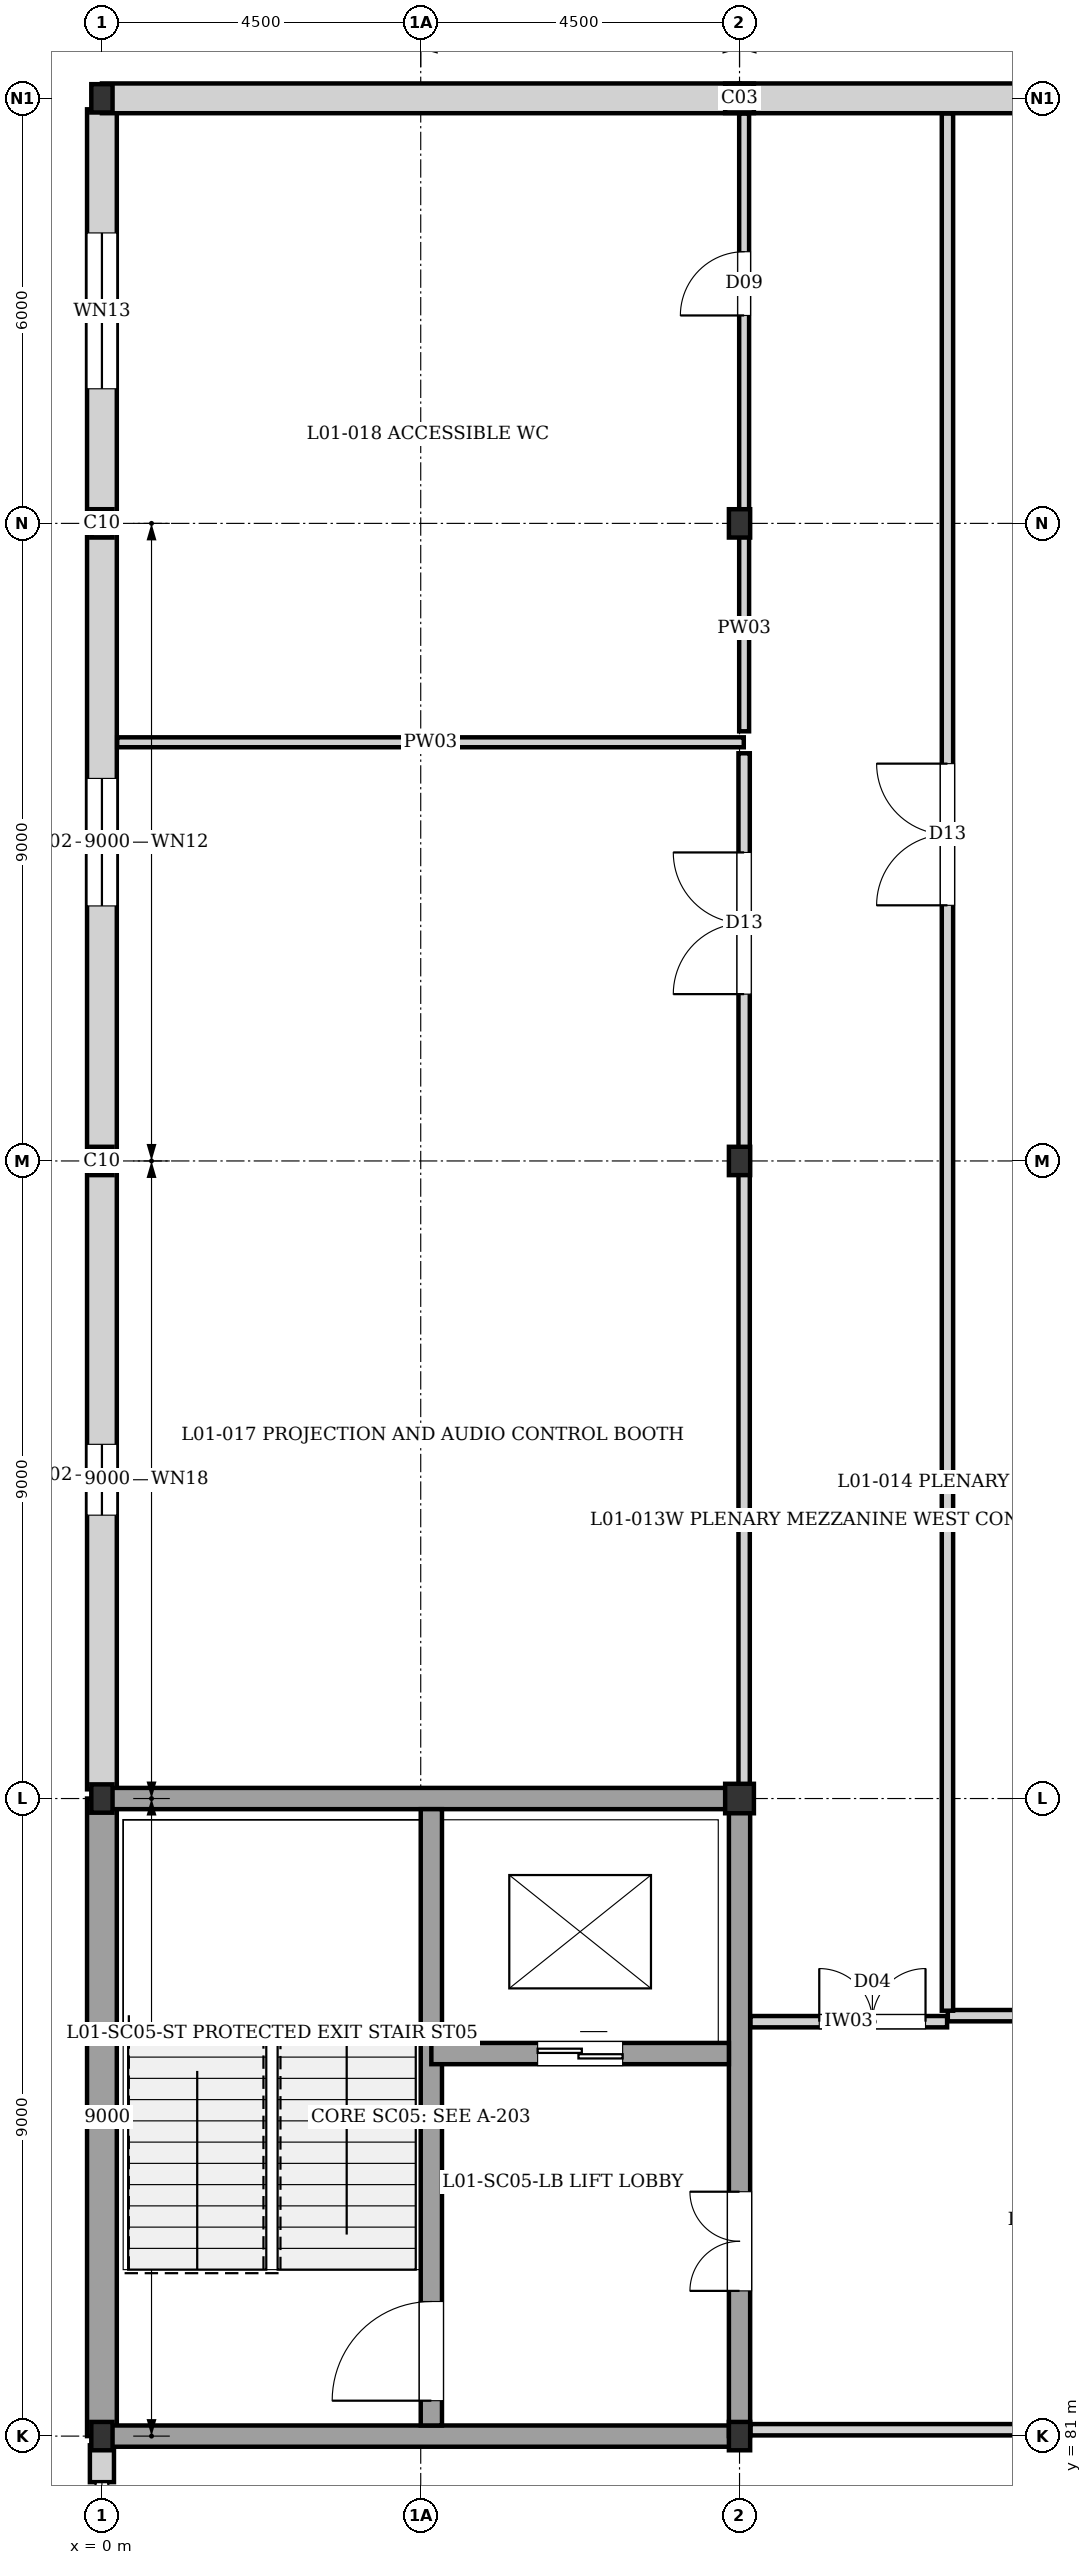
"""IFC4 building model, lengths in metres.
Left out: names, types, materials, properties, quantities, classifications, styles, units other than length and angle.
Written with IfcOpenShell. Run it as: python <this file> out.ifc"""

import sys

from ifc_helpers import new_model, si_unit, direction, frame, frame_2d, origin, origin_2d, place, context, subcontext, project, spatial, rectangle, i_section, extrude, element, fill, save


model = new_model("IFC4")
c1 = context("Model", 3, precision=1e-05, world=origin(), true_north=direction((0.0, 1.0)))
c2 = subcontext(c1, "Body", "Model", "MODEL_VIEW")
j1 = project(units=[si_unit("LENGTHUNIT", "METRE"), si_unit("PLANEANGLEUNIT", "RADIAN")], contexts=[c1])
p1 = place(None, origin())
s1 = spatial("IfcSite", under=j1, at=p1, CompositionType="ELEMENT")
p2 = place(p1, origin())
s2 = spatial("IfcBuilding", under=s1, at=p2, CompositionType="ELEMENT")
p3 = place(p2, frame((0.0, 0.0, 4.32)))
s3 = spatial("IfcBuildingStorey", under=s2, at=p3, CompositionType="ELEMENT", Elevation=4.32)
for number, where, z_axis, x_axis in (
    (1, (0.0, 81.0, 0.0), (0.0, 0.0, 1.0), (1.0, 0.0, 0.0)),
    (2, (0.0, 90.0, 0.0), (0.0, 0.0, 1.0), (1.0, 0.0, 0.0)),
    (3, (0.0, 99.0, 0.0), (0.0, 0.0, 1.0), (1.0, 0.0, 0.0)),
    (4, (0.0, 108.0, 0.0), (0.0, 0.0, 1.0), (1.0, 0.0, 0.0)),
    (5, (0.0, 114.0, 0.0), (0.0, 0.0, 1.0), (1.0, 0.0, 0.0)),
    (6, (9.0, 81.0, 0.0), (0.0, 0.0, 1.0), (1.0, 0.0, 0.0)),
):
    element("IfcColumn", number, at=place(p3, frame(where, z_axis=z_axis, x_axis=x_axis)), inside=s3, PredefinedType="COLUMN", context=c2, shape_type="SweptSolid", body=[
        extrude(i_section(OverallWidth=0.3, OverallDepth=0.4, WebThickness=0.013, FlangeThickness=0.024, at=origin_2d()), origin(), (0.0, 0.0, 1.0), 3.84),
    ])
p4 = place(p3, frame((9.0, 90.0, 0.0), z_axis=(0.0, 0.0, 1.0), x_axis=(1.0, 0.0, 0.0)))
e7 = element("IfcColumn", 7, at=p4, inside=s3, PredefinedType="COLUMN", context=c2, shape_type="SweptSolid", body=[
    extrude(i_section(OverallWidth=0.406, OverallDepth=0.416, WebThickness=0.022, FlangeThickness=0.038, at=origin_2d()), origin(), (0.0, 0.0, 1.0), 3.84),
])
for number, where, z_axis, x_axis in (
    (8, (9.0, 99.0, 0.0), (0.0, 0.0, 1.0), (1.0, 0.0, 0.0)),
    (9, (9.0, 108.0, 0.0), (0.0, 0.0, 1.0), (1.0, 0.0, 0.0)),
):
    element("IfcColumn", number, at=place(p3, frame(where, z_axis=z_axis, x_axis=x_axis)), inside=s3, PredefinedType="COLUMN", context=c2, shape_type="SweptSolid", body=[
        extrude(i_section(OverallWidth=0.3, OverallDepth=0.4, WebThickness=0.013, FlangeThickness=0.024, at=origin_2d()), origin(), (0.0, 0.0, 1.0), 3.84),
    ])
p5 = place(p3, frame((9.0, 114.0, 0.0), z_axis=(0.0, 0.0, 1.0), x_axis=(1.0, 0.0, 0.0)))
e10 = element("IfcColumn", 10, at=p5, inside=s3, PredefinedType="COLUMN", context=c2, shape_type="SweptSolid", body=[
    extrude(i_section(OverallWidth=0.406, OverallDepth=0.416, WebThickness=0.022, FlangeThickness=0.038, at=origin_2d()), origin(), (0.0, 0.0, 1.0), 3.84),
])
p6 = place(p3, frame((0.0, 80.35, 0.0), z_axis=(0.0, 0.0, 1.0), x_axis=(0.0, 1.0, 0.0)))
e11 = element("IfcWall", 11, at=p6, inside=s3, PredefinedType="SOLIDWALL", context=c2, shape_type="SweptSolid", body=[
    extrude(rectangle(XDim=0.52, YDim=0.34, at=frame_2d((0.26, 0.0))), origin(), (0.0, 0.0, 1.0), 3.59),
])
p7 = place(p3, frame((0.0, 81.0, 0.0), z_axis=(0.0, 0.0, 1.0), x_axis=(0.0, 1.0, 0.0)))
e12 = element("IfcWall", 12, at=p7, inside=s3, PredefinedType="SOLIDWALL", context=c2, shape_type="SweptSolid", body=[
    extrude(rectangle(XDim=9.0, YDim=0.42, at=frame_2d((4.5, 0.0))), origin(), (0.0, 0.0, 1.0), 3.6),
])
p8 = place(p3, frame((0.0, 90.13, 0.0), z_axis=(0.0, 0.0, 1.0), x_axis=(0.0, 1.0, 0.0)))
e13 = element("IfcWall", 13, at=p8, inside=s3, PredefinedType="SOLIDWALL", context=c2, shape_type="SweptSolid", body=[
    extrude(rectangle(XDim=8.87, YDim=0.42, at=frame_2d((4.435, 0.0))), origin(), (0.0, 0.0, 1.0), 3.22),
])
p9 = place(p8, frame((3.87, 0.0, 0.4)))
e14 = element("IfcOpeningElement", 14, at=p9, cuts=e13, PredefinedType="OPENING", context=c2, shape_type="SweptSolid", body=[
    extrude(rectangle(XDim=1.0, YDim=1.6, at=frame_2d((0.5, 0.8))), frame((0.0, 0.22, 0.0), z_axis=(0.0, -1.0, 0.0), x_axis=(1.0, 0.0, 0.0)), (0.0, 0.0, 1.0), 0.44),
])
p10 = place(p3, frame((0.0, 99.0, 0.0), z_axis=(0.0, 0.0, 1.0), x_axis=(0.0, 1.0, 0.0)))
e15 = element("IfcWall", 15, at=p10, inside=s3, PredefinedType="SOLIDWALL", context=c2, shape_type="SweptSolid", body=[
    extrude(rectangle(XDim=9.0, YDim=0.42, at=frame_2d((4.5, 0.0))), origin(), (0.0, 0.0, 1.0), 3.18),
])
p11 = place(p10, frame((3.6, 0.0, 0.4)))
e16 = element("IfcOpeningElement", 16, at=p11, cuts=e15, PredefinedType="OPENING", context=c2, shape_type="SweptSolid", body=[
    extrude(rectangle(XDim=1.8, YDim=2.3, at=frame_2d((0.9, 1.15))), frame((0.0, 0.22, 0.0), z_axis=(0.0, -1.0, 0.0), x_axis=(1.0, 0.0, 0.0)), (0.0, 0.0, 1.0), 0.44),
])
p12 = place(p3, frame((0.0, 108.0, 0.0), z_axis=(0.0, 0.0, 1.0), x_axis=(0.0, 1.0, 0.0)))
e17 = element("IfcWall", 17, at=p12, inside=s3, PredefinedType="SOLIDWALL", context=c2, shape_type="SweptSolid", body=[
    extrude(rectangle(XDim=5.845, YDim=0.42, at=frame_2d((2.922, 0.0))), origin(), (0.0, 0.0, 1.0), 3.6),
])
p13 = place(p12, frame((1.9, 0.0, 0.4)))
e18 = element("IfcOpeningElement", 18, at=p13, cuts=e17, PredefinedType="OPENING", context=c2, shape_type="SweptSolid", body=[
    extrude(rectangle(XDim=2.2, YDim=1.8, at=frame_2d((1.1, 0.9))), frame((0.0, 0.22, 0.0), z_axis=(0.0, -1.0, 0.0), x_axis=(1.0, 0.0, 0.0)), (0.0, 0.0, 1.0), 0.44),
])
p14 = place(p3, frame((0.0, 114.0, 0.0), z_axis=(0.0, 0.0, 1.0), x_axis=(1.0, 0.0, 0.0)))
e19 = element("IfcWall", 19, at=p14, inside=s3, PredefinedType="SOLIDWALL", context=c2, shape_type="SweptSolid", body=[
    extrude(rectangle(XDim=9.0, YDim=0.42, at=frame_2d((4.5, 0.0))), origin(), (0.0, 0.0, 1.0), 3.18),
])
p15 = place(p3, frame((9.0, 114.0, 0.0), z_axis=(0.0, 0.0, 1.0), x_axis=(1.0, 0.0, 0.0)))
e20 = element("IfcWall", 20, at=p15, inside=s3, PredefinedType="SOLIDWALL", context=c2, shape_type="SweptSolid", body=[
    extrude(rectangle(XDim=9.0, YDim=0.42, at=frame_2d((4.5, 0.0))), origin(), (0.0, 0.0, 1.0), 3.35),
])
p16 = place(p3, frame((0.0, 81.0, 0.0), z_axis=(0.0, 0.0, 1.0), x_axis=(1.0, 0.0, 0.0)))
e21 = element("IfcWall", 21, at=p16, inside=s3, PredefinedType="SHEAR", context=c2, shape_type="SweptSolid", body=[
    extrude(rectangle(XDim=9.0, YDim=0.3, at=frame_2d((4.5, 0.0))), origin(), (0.0, 0.0, 1.0), 3.6),
])
p17 = place(p3, frame((9.0, 81.0, 0.0), z_axis=(0.0, 0.0, 1.0), x_axis=(0.0, 1.0, 0.0)))
e22 = element("IfcWall", 22, at=p17, inside=s3, PredefinedType="SHEAR", context=c2, shape_type="SweptSolid", body=[
    extrude(rectangle(XDim=9.0, YDim=0.3, at=frame_2d((4.5, 0.0))), origin(), (0.0, 0.0, 1.0), 3.6),
])
p18 = place(p17, frame((2.05, 0.0, 0.0)))
e23 = element("IfcOpeningElement", 23, at=p18, cuts=e22, PredefinedType="OPENING", context=c2, shape_type="SweptSolid", body=[
    extrude(rectangle(XDim=1.4, YDim=2.02, at=frame_2d((0.7, 1.01))), frame((0.0, 0.16, 0.0), z_axis=(0.0, -1.0, 0.0), x_axis=(1.0, 0.0, 0.0)), (0.0, 0.0, 1.0), 0.32),
])
p19 = place(p3, frame((0.0, 90.0, 0.0), z_axis=(0.0, 0.0, 1.0), x_axis=(1.0, 0.0, 0.0)))
e24 = element("IfcWall", 24, at=p19, inside=s3, PredefinedType="SHEAR", context=c2, shape_type="SweptSolid", body=[
    extrude(rectangle(XDim=9.0, YDim=0.3, at=frame_2d((4.5, 0.0))), origin(), (0.0, 0.0, 1.0), 3.6),
])
p20 = place(p3, frame((4.65, 81.15, 0.0), z_axis=(0.0, 0.0, 1.0), x_axis=(0.0, 1.0, 0.0)))
e25 = element("IfcWall", 25, at=p20, inside=s3, PredefinedType="SHEAR", context=c2, shape_type="SweptSolid", body=[
    extrude(rectangle(XDim=8.7, YDim=0.3, at=frame_2d((4.35, 0.0))), origin(), (0.0, 0.0, 1.0), 3.6),
])
p21 = place(p20, frame((0.35, 0.0, 0.0)))
e26 = element("IfcOpeningElement", 26, at=p21, cuts=e25, PredefinedType="OPENING", context=c2, shape_type="SweptSolid", body=[
    extrude(rectangle(XDim=1.4, YDim=2.02, at=frame_2d((0.7, 1.01))), frame((0.0, 0.16, 0.0), z_axis=(0.0, -1.0, 0.0), x_axis=(1.0, 0.0, 0.0)), (0.0, 0.0, 1.0), 0.32),
])
p22 = place(p3, frame((4.65, 86.4, 0.0), z_axis=(0.0, 0.0, 1.0), x_axis=(1.0, 0.0, 0.0)))
e27 = element("IfcWall", 27, at=p22, inside=s3, PredefinedType="SHEAR", context=c2, shape_type="SweptSolid", body=[
    extrude(rectangle(XDim=4.2, YDim=0.3, at=frame_2d((2.1, 0.0))), origin(), (0.0, 0.0, 1.0), 3.6),
])
p23 = place(p22, frame((1.5, 0.0, 0.0)))
e28 = element("IfcOpeningElement", 28, at=p23, cuts=e27, PredefinedType="OPENING", context=c2, shape_type="SweptSolid", body=[
    extrude(rectangle(XDim=1.2, YDim=2.2, at=frame_2d((0.6, 1.1))), frame((0.0, 0.16, 0.0), z_axis=(0.0, -1.0, 0.0), x_axis=(1.0, 0.0, 0.0)), (0.0, 0.0, 1.0), 0.32),
])
p24 = place(p3, frame((11.94, 86.935, 0.0), z_axis=(0.0, 0.0, 1.0), x_axis=(1.0, 0.0, 0.0)))
e29 = element("IfcWall", 29, at=p24, inside=s3, PredefinedType="PARTITIONING", context=c2, shape_type="SweptSolid", body=[
    extrude(rectangle(XDim=5.79, YDim=0.16, at=frame_2d((2.895, 0.0))), origin(), (0.0, 0.0, 1.0), 3.6),
])
p25 = place(p3, frame((0.215, 104.91, 0.0), z_axis=(0.0, 0.0, 1.0), x_axis=(1.0, 0.0, 0.0)))
e30 = element("IfcWall", 30, at=p25, inside=s3, PredefinedType="PLUMBINGWALL", context=c2, shape_type="SweptSolid", body=[
    extrude(rectangle(XDim=8.845, YDim=0.14, at=frame_2d((4.422, 0.0))), origin(), (0.0, 0.0, 1.0), 3.6),
])
p26 = place(p3, frame((9.155, 86.85, 0.0), z_axis=(0.0, 0.0, 1.0), x_axis=(1.0, 0.0, 0.0)))
e31 = element("IfcWall", 31, at=p26, inside=s3, PredefinedType="PARTITIONING", context=c2, shape_type="SweptSolid", body=[
    extrude(rectangle(XDim=2.775, YDim=0.16, at=frame_2d((1.387, 0.0))), origin(), (0.0, 0.0, 1.0), 3.6),
])
p27 = place(p26, frame((0.97, 0.0, 0.0)))
e32 = element("IfcOpeningElement", 32, at=p27, cuts=e31, PredefinedType="OPENING", context=c2, shape_type="SweptSolid", body=[
    extrude(rectangle(XDim=1.5, YDim=2.1, at=frame_2d((0.75, 1.05))), frame((0.0, 0.09, 0.0), z_axis=(0.0, -1.0, 0.0), x_axis=(1.0, 0.0, 0.0)), (0.0, 0.0, 1.0), 0.18),
])
p28 = place(p3, frame((9.155, 81.09, 0.0), z_axis=(0.0, 0.0, 1.0), x_axis=(1.0, 0.0, 0.0)))
e33 = element("IfcWall", 33, at=p28, inside=s3, PredefinedType="PARTITIONING", context=c2, shape_type="SweptSolid", body=[
    extrude(rectangle(XDim=8.825, YDim=0.16, at=frame_2d((4.413, 0.0))), origin(), (0.0, 0.0, 1.0), 3.35),
])
p29 = place(p3, frame((11.935, 87.005, 0.0), z_axis=(0.0, 0.0, 1.0), x_axis=(0.0, 1.0, 0.0)))
e34 = element("IfcWall", 34, at=p29, inside=s3, PredefinedType="PARTITIONING", context=c2, shape_type="SweptSolid", body=[
    extrude(rectangle(XDim=26.78, YDim=0.16, at=frame_2d((13.39, 0.0))), origin(), (0.0, 0.0, 1.0), 3.6),
])
p30 = place(p29, frame((15.604, 0.0, 0.0)))
e35 = element("IfcOpeningElement", 35, at=p30, cuts=e34, PredefinedType="OPENING", context=c2, shape_type="SweptSolid", body=[
    extrude(rectangle(XDim=2.0, YDim=2.35, at=frame_2d((1.0, 1.175))), frame((0.0, 0.09, 0.0), z_axis=(0.0, -1.0, 0.0), x_axis=(1.0, 0.0, 0.0)), (0.0, 0.0, 1.0), 0.18),
])
p31 = place(p3, frame((9.065, 90.155, 0.0), z_axis=(0.0, 0.0, 1.0), x_axis=(0.0, 1.0, 0.0)))
e36 = element("IfcWall", 36, at=p31, inside=s3, PredefinedType="PARTITIONING", context=c2, shape_type="SweptSolid", body=[
    extrude(rectangle(XDim=8.825, YDim=0.16, at=frame_2d((4.413, 0.0))), origin(), (0.0, 0.0, 1.0), 3.29),
])
p32 = place(p3, frame((9.065, 105.065, 0.0), z_axis=(0.0, 0.0, 1.0), x_axis=(0.0, 1.0, 0.0)))
e37 = element("IfcWall", 37, at=p32, inside=s3, PredefinedType="PLUMBINGWALL", context=c2, shape_type="SweptSolid", body=[
    extrude(rectangle(XDim=2.915, YDim=0.14, at=frame_2d((1.458, 0.0))), origin(), (0.0, 0.0, 1.0), 3.25),
])
p33 = place(p3, frame((9.065, 98.98, 0.0), z_axis=(0.0, 0.0, 1.0), x_axis=(0.0, 1.0, 0.0)))
e38 = element("IfcWall", 38, at=p33, inside=s3, PredefinedType="PARTITIONING", context=c2, shape_type="SweptSolid", body=[
    extrude(rectangle(XDim=5.775, YDim=0.16, at=frame_2d((2.887, 0.0))), origin(), (0.0, 0.0, 1.0), 3.25),
])
p34 = place(p33, frame((2.375, 0.0, 0.0)))
e39 = element("IfcOpeningElement", 39, at=p34, cuts=e38, PredefinedType="OPENING", context=c2, shape_type="SweptSolid", body=[
    extrude(rectangle(XDim=2.0, YDim=2.35, at=frame_2d((1.0, 1.175))), frame((0.0, 0.09, 0.0), z_axis=(0.0, -1.0, 0.0), x_axis=(1.0, 0.0, 0.0)), (0.0, 0.0, 1.0), 0.18),
])
p35 = place(p3, frame((9.065, 107.98, 0.0), z_axis=(0.0, 0.0, 1.0), x_axis=(0.0, 1.0, 0.0)))
e40 = element("IfcWall", 40, at=p35, inside=s3, PredefinedType="PLUMBINGWALL", context=c2, shape_type="SweptSolid", body=[
    extrude(rectangle(XDim=5.805, YDim=0.14, at=frame_2d((2.902, 0.0))), origin(), (0.0, 0.0, 1.0), 3.19),
])
p36 = place(p35, frame((2.955, 0.0, 0.0)))
e41 = element("IfcOpeningElement", 41, at=p36, cuts=e40, PredefinedType="OPENING", context=c2, shape_type="SweptSolid", body=[
    extrude(rectangle(XDim=0.9, YDim=2.1, at=frame_2d((0.45, 1.05))), frame((0.0, 0.08, 0.0), z_axis=(0.0, -1.0, 0.0), x_axis=(1.0, 0.0, 0.0)), (0.0, 0.0, 1.0), 0.16),
])
p37 = place(p9, origin())
e42 = element("IfcWindow", 42, at=p37, inside=s3, PartitioningType="SINGLE_PANEL", PredefinedType="WINDOW", context=c2, shape_type="SweptSolid", body=[
    extrude(rectangle(XDim=1.0, YDim=1.6, at=frame_2d((0.5, 0.8))), frame((0.0, 0.03, 0.0), z_axis=(0.0, -1.0, 0.0), x_axis=(1.0, 0.0, 0.0)), (0.0, 0.0, 1.0), 0.06),
])
fill(e14, e42)
p38 = place(p11, origin())
e43 = element("IfcWindow", 43, at=p38, inside=s3, PartitioningType="SINGLE_PANEL", PredefinedType="WINDOW", context=c2, shape_type="SweptSolid", body=[
    extrude(rectangle(XDim=1.8, YDim=2.3, at=frame_2d((0.9, 1.15))), frame((0.0, 0.03, 0.0), z_axis=(0.0, -1.0, 0.0), x_axis=(1.0, 0.0, 0.0)), (0.0, 0.0, 1.0), 0.06),
])
fill(e16, e43)
p39 = place(p13, origin())
e44 = element("IfcWindow", 44, at=p39, inside=s3, PartitioningType="SINGLE_PANEL", PredefinedType="WINDOW", context=c2, shape_type="SweptSolid", body=[
    extrude(rectangle(XDim=2.2, YDim=1.8, at=frame_2d((1.1, 0.9))), frame((0.0, 0.03, 0.0), z_axis=(0.0, -1.0, 0.0), x_axis=(1.0, 0.0, 0.0)), (0.0, 0.0, 1.0), 0.06),
])
fill(e18, e44)
p40 = place(p18, origin())
e45 = element("IfcDoor", 45, at=p40, inside=s3, OperationType="DOUBLE_DOOR_SINGLE_SWING", PredefinedType="DOOR", context=c2, shape_type="SweptSolid", body=[
    extrude(rectangle(XDim=1.4, YDim=2.02, at=frame_2d((0.7, 1.01))), frame((0.0, 0.025, 0.0), z_axis=(0.0, -1.0, 0.0), x_axis=(1.0, 0.0, 0.0)), (0.0, 0.0, 1.0), 0.05),
])
fill(e23, e45)
p41 = place(p21, origin())
e46 = element("IfcDoor", 46, at=p41, inside=s3, OperationType="SINGLE_SWING_LEFT", PredefinedType="DOOR", context=c2, shape_type="SweptSolid", body=[
    extrude(rectangle(XDim=1.4, YDim=2.02, at=frame_2d((0.7, 1.01))), frame((0.0, 0.025, 0.0), z_axis=(0.0, -1.0, 0.0), x_axis=(1.0, 0.0, 0.0)), (0.0, 0.0, 1.0), 0.05),
])
fill(e26, e46)
p42 = place(p23, origin())
e47 = element("IfcDoor", 47, at=p42, inside=s3, OperationType="DOUBLE_DOOR_SLIDING", PredefinedType="DOOR", context=c2, shape_type="SweptSolid", body=[
    extrude(rectangle(XDim=1.2, YDim=2.2, at=frame_2d((0.6, 1.1))), frame((0.0, 0.025, 0.0), z_axis=(0.0, -1.0, 0.0), x_axis=(1.0, 0.0, 0.0)), (0.0, 0.0, 1.0), 0.05),
])
fill(e28, e47)
p43 = place(p27, origin())
e48 = element("IfcDoor", 48, at=p43, inside=s3, OperationType="DOUBLE_DOOR_SINGLE_SWING", PredefinedType="DOOR", context=c2, shape_type="SweptSolid", body=[
    extrude(rectangle(XDim=1.5, YDim=2.1, at=frame_2d((0.75, 1.05))), frame((0.0, 0.025, 0.0), z_axis=(0.0, -1.0, 0.0), x_axis=(1.0, 0.0, 0.0)), (0.0, 0.0, 1.0), 0.05),
])
fill(e32, e48)
p44 = place(p30, origin())
e49 = element("IfcDoor", 49, at=p44, inside=s3, OperationType="DOUBLE_DOOR_SINGLE_SWING", PredefinedType="DOOR", context=c2, shape_type="SweptSolid", body=[
    extrude(rectangle(XDim=2.0, YDim=2.35, at=frame_2d((1.0, 1.175))), frame((0.0, 0.025, 0.0), z_axis=(0.0, -1.0, 0.0), x_axis=(1.0, 0.0, 0.0)), (0.0, 0.0, 1.0), 0.05),
])
fill(e35, e49)
p45 = place(p34, origin())
e50 = element("IfcDoor", 50, at=p45, inside=s3, OperationType="DOUBLE_DOOR_SINGLE_SWING", PredefinedType="DOOR", context=c2, shape_type="SweptSolid", body=[
    extrude(rectangle(XDim=2.0, YDim=2.35, at=frame_2d((1.0, 1.175))), frame((0.0, 0.025, 0.0), z_axis=(0.0, -1.0, 0.0), x_axis=(1.0, 0.0, 0.0)), (0.0, 0.0, 1.0), 0.05),
])
fill(e39, e50)
p46 = place(p36, origin())
e51 = element("IfcDoor", 51, at=p46, inside=s3, OperationType="SINGLE_SWING_LEFT", PredefinedType="DOOR", context=c2, shape_type="SweptSolid", body=[
    extrude(rectangle(XDim=0.9, YDim=2.1, at=frame_2d((0.45, 1.05))), frame((0.0, 0.025, 0.0), z_axis=(0.0, -1.0, 0.0), x_axis=(1.0, 0.0, 0.0)), (0.0, 0.0, 1.0), 0.05),
])
fill(e41, e51)
save(model, sys.argv[1])
